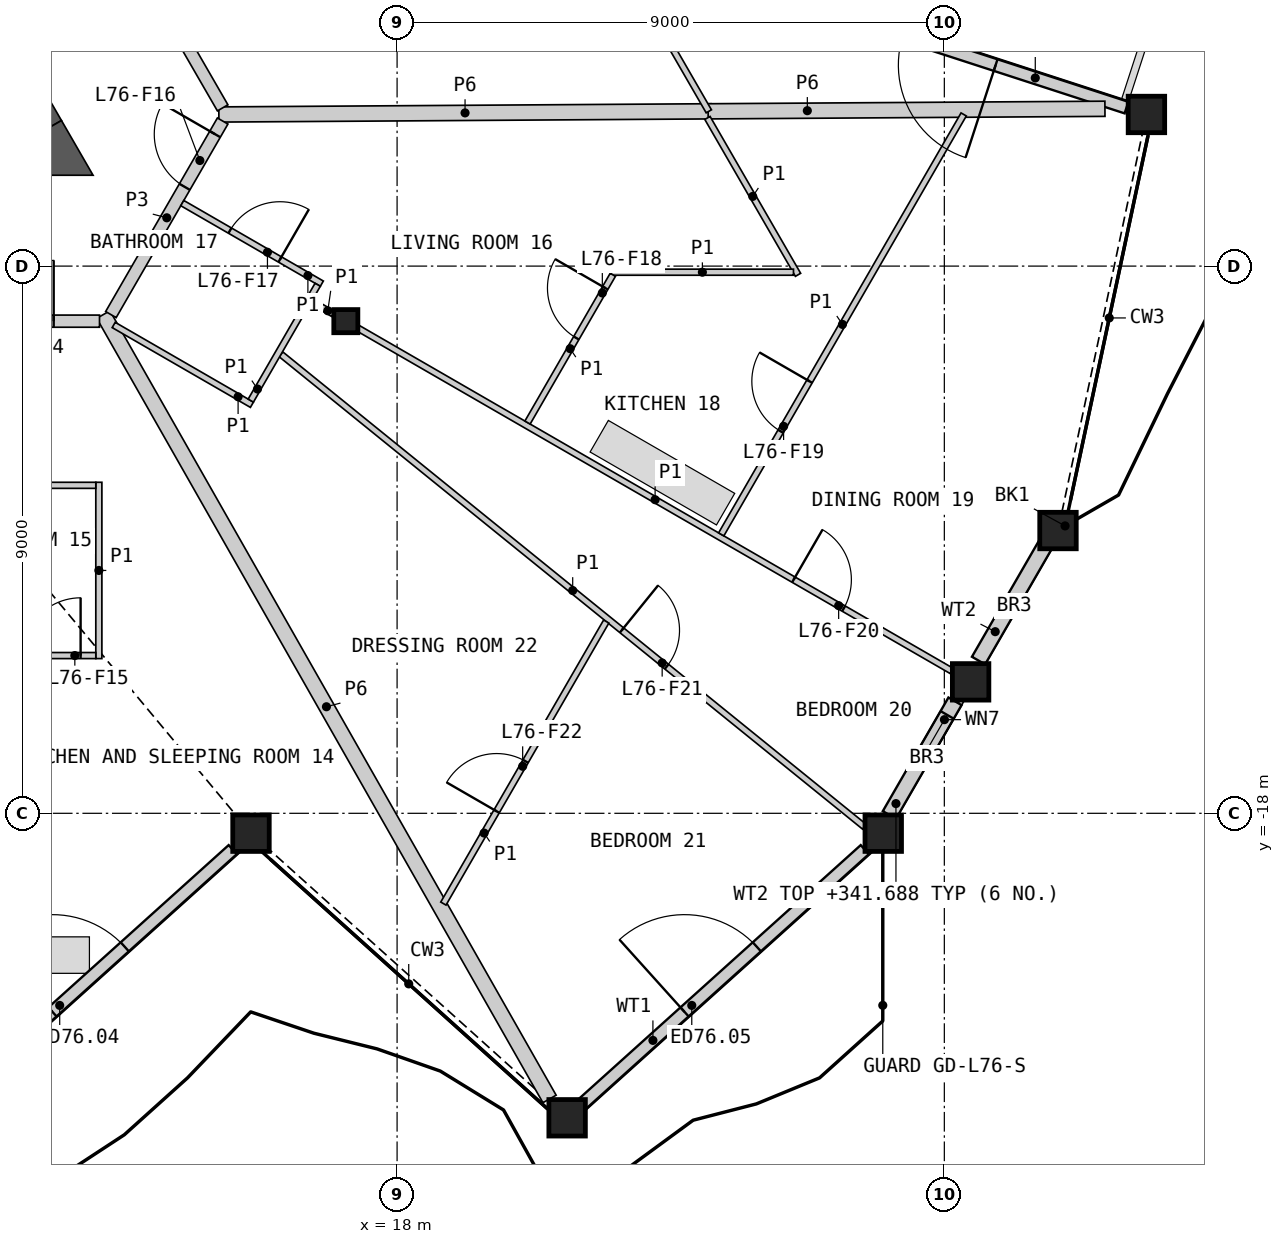
"""IFC4 building model, lengths in metres.
Left out: names, types, materials, properties, quantities, classifications, styles, units other than length and angle.
Written with IfcOpenShell. Run it as: python <this file> out.ifc"""

import sys

from ifc_helpers import new_model, si_unit, direction, frame, frame_2d, origin, origin_2d, place, context, subcontext, project, spatial, polyline, rectangle, hollow_rectangle, i_section, outline, extrude, element, fill, save


model = new_model("IFC4")
c1 = context("Model", 3, precision=1e-05, world=origin(), true_north=direction((0.0, 1.0)))
c2 = subcontext(c1, "Body", "Model", "MODEL_VIEW")
j1 = project(units=[si_unit("LENGTHUNIT", "METRE"), si_unit("PLANEANGLEUNIT", "RADIAN")], contexts=[c1])
p1 = place(None, origin())
s1 = spatial("IfcSite", under=j1, at=p1, CompositionType="ELEMENT")
p2 = place(p1, origin())
s2 = spatial("IfcBuilding", under=s1, at=p2, CompositionType="ELEMENT")
p3 = place(p2, frame((0.0, 0.0, 339.2)))
s3 = spatial("IfcBuildingStorey", under=s2, at=p3, CompositionType="ELEMENT", Elevation=339.2)
for number, where, z_axis, x_axis in (
    (1, (15.597, -18.327, 0.0), (0.0, 0.0, 1.0), (1.0, 0.0, 0.0)),
    (2, (20.796, -23.008, 0.0), (0.0, 0.0, 1.0), (1.0, 0.0, 0.0)),
    (3, (25.995, -18.327, 0.0), (0.0, 0.0, 1.0), (1.0, 0.0, 0.0)),
    (4, (27.432, -15.838, 0.0), (0.0, 0.0, 1.0), (1.0, 0.0, 0.0)),
    (5, (28.869, -13.349, 0.0), (0.0, 0.0, 1.0), (1.0, 0.0, 0.0)),
    (6, (30.324, -6.506, 0.0), (0.0, 0.0, 1.0), (1.0, 0.0, 0.0)),
):
    element("IfcColumn", number, at=place(p3, frame(where, z_axis=z_axis, x_axis=x_axis)), inside=s3, PredefinedType="COLUMN", context=c2, shape_type="SweptSolid", body=[
        extrude(hollow_rectangle(XDim=0.6, YDim=0.6, WallThickness=0.04, at=origin_2d()), origin(), (0.0, 0.0, 1.0), 3.4),
    ])
p4 = place(p3, frame((17.157, -9.906, 0.0), z_axis=(0.0, 0.0, 1.0), x_axis=(1.0, 0.0, 0.0)))
e7 = element("IfcColumn", 7, at=p4, inside=s3, PredefinedType="COLUMN", context=c2, shape_type="SweptSolid", body=[
    extrude(i_section(OverallWidth=0.396, OverallDepth=0.381, WebThickness=0.019, FlangeThickness=0.03, at=origin_2d()), origin(), (0.0, 0.0, 1.0), 3.4),
])
p5 = place(p3, frame((10.651, -22.781, 0.0), z_axis=(0.0, 0.0, 1.0), x_axis=(0.743154335217, 0.669120044572, 0.0)))
e8 = element("IfcWall", 8, at=p5, inside=s3, PredefinedType="SOLIDWALL", context=c2, shape_type="SweptSolid", body=[
    extrude(rectangle(XDim=6.252, YDim=0.2, at=frame_2d((3.126, 0.0))), origin(), (0.0, 0.0, 1.0), 2.488),
])
p6 = place(p5, frame((2.263, 0.0, 0.0)))
e9 = element("IfcOpeningElement", 9, at=p6, cuts=e8, PredefinedType="OPENING", context=c2, shape_type="SweptSolid", body=[
    extrude(rectangle(XDim=1.6, YDim=2.25, at=frame_2d((0.8, 1.125))), frame((0.0, 0.11, 0.0), z_axis=(0.0, -1.0, 0.0), x_axis=(1.0, 0.0, 0.0)), (0.0, 0.0, 1.0), 0.22),
])
p7 = place(p3, frame((21.046, -22.781, 0.0), z_axis=(0.0, 0.0, 1.0), x_axis=(0.743154335217, 0.669120044572, 0.0)))
e10 = element("IfcWall", 10, at=p7, inside=s3, PredefinedType="SOLIDWALL", context=c2, shape_type="SweptSolid", body=[
    extrude(rectangle(XDim=6.252, YDim=0.2, at=frame_2d((3.126, 0.0))), origin(), (0.0, 0.0, 1.0), 2.488),
])
p8 = place(p7, frame((2.263, 0.0, 0.0)))
e11 = element("IfcOpeningElement", 11, at=p8, cuts=e10, PredefinedType="OPENING", context=c2, shape_type="SweptSolid", body=[
    extrude(rectangle(XDim=1.6, YDim=2.25, at=frame_2d((0.8, 1.125))), frame((0.0, 0.11, 0.0), z_axis=(0.0, -1.0, 0.0), x_axis=(1.0, 0.0, 0.0)), (0.0, 0.0, 1.0), 0.22),
])
p9 = place(p3, frame((26.096, -18.027, 0.0), z_axis=(0.0, 0.0, 1.0), x_axis=(0.499983569942, 0.866034889475, 0.0)))
e12 = element("IfcWall", 12, at=p9, inside=s3, PredefinedType="SOLIDWALL", context=c2, shape_type="SweptSolid", body=[
    extrude(rectangle(XDim=2.158, YDim=0.25, at=frame_2d((1.079, 0.0))), origin(), (0.0, 0.0, 1.0), 2.488),
])
p10 = place(p9, frame((1.0, 0.0, 1.6)))
e13 = element("IfcOpeningElement", 13, at=p10, cuts=e12, PredefinedType="OPENING", context=c2, shape_type="SweptSolid", body=[
    extrude(rectangle(XDim=0.9, YDim=0.6, at=frame_2d((0.45, 0.3))), frame((0.0, 0.135, 0.0), z_axis=(0.0, -1.0, 0.0), x_axis=(1.0, 0.0, 0.0)), (0.0, 0.0, 1.0), 0.27),
])
p11 = place(p3, frame((27.562, -15.488, 0.0), z_axis=(0.0, 0.0, 1.0), x_axis=(0.500049712553, 0.865996700326, 0.0)))
e14 = element("IfcWall", 14, at=p11, inside=s3, PredefinedType="SOLIDWALL", context=c2, shape_type="SweptSolid", body=[
    extrude(rectangle(XDim=2.196, YDim=0.25, at=frame_2d((1.098, 0.0))), origin(), (0.0, 0.0, 1.0), 2.488),
])
p12 = place(p3, frame((29.996, -6.393, 0.0), z_axis=(0.0, 0.0, 1.0), x_axis=(-0.951051127664, 0.309033578383, 0.0)))
e15 = element("IfcWall", 15, at=p12, inside=s3, PredefinedType="SOLIDWALL", context=c2, shape_type="SweptSolid", body=[
    extrude(rectangle(XDim=6.31, YDim=0.2, at=frame_2d((3.155, 0.0))), origin(), (0.0, 0.0, 1.0), 2.488),
])
p13 = place(p12, frame((2.263, 0.0, 0.0)))
e16 = element("IfcOpeningElement", 16, at=p13, cuts=e15, PredefinedType="OPENING", context=c2, shape_type="SweptSolid", body=[
    extrude(rectangle(XDim=1.6, YDim=2.25, at=frame_2d((0.8, 1.125))), frame((0.0, 0.11, 0.0), z_axis=(0.0, -1.0, 0.0), x_axis=(1.0, 0.0, 0.0)), (0.0, 0.0, 1.0), 0.22),
])
p14 = place(p3, frame((12.221, -6.756, 0.0), z_axis=(0.0, 0.0, 1.0), x_axis=(-0.50000604952, 0.866021911064, 0.0)))
e17 = element("IfcWall", 17, at=p14, inside=s3, PredefinedType="SHEAR", context=c2, shape_type="SweptSolid", body=[
    extrude(rectangle(XDim=4.869, YDim=0.6, at=frame_2d((2.434, 0.0))), origin(), (0.0, 0.0, 1.0), 3.1),
])
p15 = place(p3, origin())
e18 = element("IfcWall", 18, at=p15, inside=s3, PredefinedType="SHEAR", context=c2, shape_type="SweptSolid", body=[
    extrude(outline(polyline([(11.961, -7.506), (11.961, -6.906), (12.48, -6.606), (13.0, -7.506), (11.961, -7.506)])), origin(), (0.0, 0.0, 1.0), 3.1),
])
p16 = place(p3, frame((13.169, -9.797, 0.0), z_axis=(0.0, 0.0, 1.0), x_axis=(0.494414335079, -0.869226360201, 0.0)))
e19 = element("IfcWall", 19, at=p16, inside=s3, PredefinedType="PARTITIONING", context=c2, shape_type="SweptSolid", body=[
    extrude(rectangle(XDim=14.842, YDim=0.25, at=frame_2d((7.421, 0.0))), origin(), (0.0, 0.0, 1.0), 2.33),
])
p17 = place(p3, frame((15.069, -6.506, 0.0), z_axis=(0.0, 0.0, 1.0), x_axis=(0.999979186485, 0.006451867641, 0.0)))
e20 = element("IfcWall", 20, at=p17, inside=s3, PredefinedType="PARTITIONING", context=c2, shape_type="SweptSolid", body=[
    extrude(rectangle(XDim=8.098, YDim=0.25, at=frame_2d((4.049, 0.0))), origin(), (0.0, 0.0, 1.0), 2.33),
])
p18 = place(p3, frame((23.115, -6.455, 0.0), z_axis=(0.0, 0.0, 1.0), x_axis=(0.999979299397, 0.006434343627, 0.0)))
e21 = element("IfcWall", 21, at=p18, inside=s3, PredefinedType="PARTITIONING", context=c2, shape_type="SweptSolid", body=[
    extrude(rectangle(XDim=6.526, YDim=0.25, at=frame_2d((3.263, 0.0))), origin(), (0.0, 0.0, 1.0), 2.33),
])
p19 = place(p3, frame((8.786, -9.906, 0.0), z_axis=(0.0, 0.0, 1.0), x_axis=(1.0, 0.0, 0.0)))
e22 = element("IfcWall", 22, at=p19, inside=s3, PredefinedType="PARTITIONING", context=c2, shape_type="SweptSolid", body=[
    extrude(rectangle(XDim=4.32, YDim=0.2, at=frame_2d((2.16, 0.0))), origin(), (0.0, 0.0, 1.0), 3.1),
])
p20 = place(p19, frame((2.566, 0.0, 0.0)))
e23 = element("IfcOpeningElement", 23, at=p20, cuts=e22, PredefinedType="OPENING", context=c2, shape_type="SweptSolid", body=[
    extrude(rectangle(XDim=1.0, YDim=2.1, at=frame_2d((0.5, 1.05))), frame((0.0, 0.11, 0.0), z_axis=(0.0, -1.0, 0.0), x_axis=(1.0, 0.0, 0.0)), (0.0, 0.0, 1.0), 0.22),
])
p21 = place(p3, frame((12.988, -2.684, 0.0), z_axis=(0.0, 0.0, 1.0), x_axis=(0.500003406062, -0.866023437285, 0.0)))
e24 = element("IfcWall", 24, at=p21, inside=s3, PredefinedType="PARTITIONING", context=c2, shape_type="SweptSolid", body=[
    extrude(rectangle(XDim=4.288, YDim=0.2, at=frame_2d((2.144, 0.0))), origin(), (0.0, 0.0, 1.0), 3.1),
])
p22 = place(p3, frame((13.293, -9.797, 0.0), z_axis=(0.0, 0.0, 1.0), x_axis=(0.499967746641, 0.866044024469, 0.0)))
e25 = element("IfcWall", 25, at=p22, inside=s3, PredefinedType="PARTITIONING", context=c2, shape_type="SweptSolid", body=[
    extrude(rectangle(XDim=3.676, YDim=0.2, at=frame_2d((1.838, 0.0))), origin(), (0.0, 0.0, 1.0), 3.1),
])
p23 = place(p22, frame((2.426, 0.0, 0.0)))
e26 = element("IfcOpeningElement", 26, at=p23, cuts=e25, PredefinedType="OPENING", context=c2, shape_type="SweptSolid", body=[
    extrude(rectangle(XDim=1.0, YDim=2.1, at=frame_2d((0.5, 1.05))), frame((0.0, 0.11, 0.0), z_axis=(0.0, -1.0, 0.0), x_axis=(1.0, 0.0, 0.0)), (0.0, 0.0, 1.0), 0.22),
])
p24 = place(p3, frame((16.091, -10.451, 0.0), z_axis=(0.0, 0.0, 1.0), x_axis=(0.77714308631, -0.629323941544, 0.0)))
e27 = element("IfcWall", 27, at=p24, inside=s3, PredefinedType="PARTITIONING", context=c2, shape_type="SweptSolid", body=[
    extrude(rectangle(XDim=12.346, YDim=0.1, at=frame_2d((6.173, 0.0))), origin(), (0.0, 0.0, 1.0), 2.33),
])
p25 = place(p24, frame((7.211, 0.0, 0.0)))
e28 = element("IfcOpeningElement", 28, at=p25, cuts=e27, PredefinedType="OPENING", context=c2, shape_type="SweptSolid", body=[
    extrude(rectangle(XDim=0.95, YDim=2.1, at=frame_2d((0.475, 1.05))), frame((0.0, 0.06, 0.0), z_axis=(0.0, -1.0, 0.0), x_axis=(1.0, 0.0, 0.0)), (0.0, 0.0, 1.0), 0.12),
])
p26 = place(p3, frame((17.365, -10.025, 0.0), z_axis=(0.0, 0.0, 1.0), x_axis=(0.866021046153, -0.500007547564, 0.0)))
e29 = element("IfcWall", 29, at=p26, inside=s3, PredefinedType="PARTITIONING", context=c2, shape_type="SweptSolid", body=[
    extrude(rectangle(XDim=11.267, YDim=0.1, at=frame_2d((5.634, 0.0))), origin(), (0.0, 0.0, 1.0), 2.33),
])
p27 = place(p26, frame((8.264, 0.0, 0.0)))
e30 = element("IfcOpeningElement", 30, at=p27, cuts=e29, PredefinedType="OPENING", context=c2, shape_type="SweptSolid", body=[
    extrude(rectangle(XDim=0.95, YDim=2.1, at=frame_2d((0.475, 1.05))), frame((0.0, 0.06, 0.0), z_axis=(0.0, -1.0, 0.0), x_axis=(1.0, 0.0, 0.0)), (0.0, 0.0, 1.0), 0.12),
])
p28 = place(p3, frame((23.331, -13.412, 0.0), z_axis=(0.0, 0.0, 1.0), x_axis=(0.499994510044, 0.866028573389, 0.0)))
e31 = element("IfcWall", 31, at=p28, inside=s3, PredefinedType="PARTITIONING", context=c2, shape_type="SweptSolid", body=[
    extrude(rectangle(XDim=7.975, YDim=0.1, at=frame_2d((3.988, 0.0))), origin(), (0.0, 0.0, 1.0), 2.33),
])
p29 = place(p28, frame((1.957, 0.0, 0.0)))
e32 = element("IfcOpeningElement", 32, at=p29, cuts=e31, PredefinedType="OPENING", context=c2, shape_type="SweptSolid", body=[
    extrude(rectangle(XDim=0.95, YDim=2.1, at=frame_2d((0.475, 1.05))), frame((0.0, 0.06, 0.0), z_axis=(0.0, -1.0, 0.0), x_axis=(1.0, 0.0, 0.0)), (0.0, 0.0, 1.0), 0.12),
])
p30 = place(p3, frame((19.773, -0.645, 0.0), z_axis=(0.0, 0.0, 1.0), x_axis=(0.499998644583, -0.866026186333, 0.0)))
e33 = element("IfcWall", 33, at=p30, inside=s3, PredefinedType="PARTITIONING", context=c2, shape_type="SweptSolid", body=[
    extrude(rectangle(XDim=6.708, YDim=0.1, at=frame_2d((3.354, 0.0))), origin(), (0.0, 0.0, 1.0), 2.33),
])
p31 = place(p30, frame((2.475, 0.0, 0.0)))
e34 = element("IfcOpeningElement", 34, at=p31, cuts=e33, PredefinedType="OPENING", context=c2, shape_type="SweptSolid", body=[
    extrude(rectangle(XDim=0.95, YDim=2.1, at=frame_2d((0.475, 1.05))), frame((0.0, 0.06, 0.0), z_axis=(0.0, -1.0, 0.0), x_axis=(1.0, 0.0, 0.0)), (0.0, 0.0, 1.0), 0.12),
])
p32 = place(p3, frame((18.761, -19.485, 0.0), z_axis=(0.0, 0.0, 1.0), x_axis=(0.500031527488, 0.866007200615, 0.0)))
e35 = element("IfcWall", 35, at=p32, inside=s3, PredefinedType="PARTITIONING", context=c2, shape_type="SweptSolid", body=[
    extrude(rectangle(XDim=5.356, YDim=0.1, at=frame_2d((2.678, 0.0))), origin(), (0.0, 0.0, 1.0), 2.33),
])
p33 = place(p32, frame((1.752, 0.0, 0.0)))
e36 = element("IfcOpeningElement", 36, at=p33, cuts=e35, PredefinedType="OPENING", context=c2, shape_type="SweptSolid", body=[
    extrude(rectangle(XDim=0.95, YDim=2.1, at=frame_2d((0.475, 1.05))), frame((0.0, 0.06, 0.0), z_axis=(0.0, -1.0, 0.0), x_axis=(1.0, 0.0, 0.0)), (0.0, 0.0, 1.0), 0.12),
])
p34 = place(p3, frame((23.104, -6.563, 0.0), z_axis=(0.0, 0.0, 1.0), x_axis=(0.499999078476, -0.866025935826, 0.0)))
e37 = element("IfcWall", 37, at=p34, inside=s3, PredefinedType="PARTITIONING", context=c2, shape_type="SweptSolid", body=[
    extrude(rectangle(XDim=2.979, YDim=0.1, at=frame_2d((1.49, 0.0))), origin(), (0.0, 0.0, 1.0), 2.33),
])
p35 = place(p3, frame((21.523, -9.1, 0.0), z_axis=(0.0, 0.0, 1.0), x_axis=(1.0, 0.0, 0.0)))
e38 = element("IfcWall", 38, at=p35, inside=s3, PredefinedType="PARTITIONING", context=c2, shape_type="SweptSolid", body=[
    extrude(rectangle(XDim=2.996, YDim=0.1, at=frame_2d((1.498, 0.0))), origin(), (0.0, 0.0, 1.0), 2.33),
])
p36 = place(p3, frame((20.145, -11.573, 0.0), z_axis=(0.0, 0.0, 1.0), x_axis=(0.49998612769, 0.866033412818, 0.0)))
e39 = element("IfcWall", 39, at=p36, inside=s3, PredefinedType="PARTITIONING", context=c2, shape_type="SweptSolid", body=[
    extrude(rectangle(XDim=2.805, YDim=0.1, at=frame_2d((1.403, 0.0))), origin(), (0.0, 0.0, 1.0), 2.33),
])
p37 = place(p36, frame((1.605, 0.0, 0.0)))
e40 = element("IfcOpeningElement", 40, at=p37, cuts=e39, PredefinedType="OPENING", context=c2, shape_type="SweptSolid", body=[
    extrude(rectangle(XDim=0.95, YDim=2.1, at=frame_2d((0.475, 1.05))), frame((0.0, 0.06, 0.0), z_axis=(0.0, -1.0, 0.0), x_axis=(1.0, 0.0, 0.0)), (0.0, 0.0, 1.0), 0.12),
])
p38 = place(p3, frame((13.095, -15.456, 0.0), z_axis=(0.0, 0.0, 1.0), x_axis=(0.0, 1.0, 0.0)))
e41 = element("IfcWall", 41, at=p38, inside=s3, PredefinedType="PARTITIONING", context=c2, shape_type="SweptSolid", body=[
    extrude(rectangle(XDim=2.9, YDim=0.1, at=frame_2d((1.45, 0.0))), origin(), (0.0, 0.0, 1.0), 2.33),
])
p39 = place(p3, frame((10.52, -12.606, 0.0), z_axis=(0.0, 0.0, 1.0), x_axis=(1.0, 0.0, 0.0)))
e42 = element("IfcWall", 42, at=p39, inside=s3, PredefinedType="PARTITIONING", context=c2, shape_type="SweptSolid", body=[
    extrude(rectangle(XDim=2.525, YDim=0.1, at=frame_2d((1.263, 0.0))), origin(), (0.0, 0.0, 1.0), 2.33),
])
p40 = place(p3, frame((10.52, -15.406, 0.0), z_axis=(0.0, 0.0, 1.0), x_axis=(1.0, 0.0, 0.0)))
e43 = element("IfcWall", 43, at=p40, inside=s3, PredefinedType="PARTITIONING", context=c2, shape_type="SweptSolid", body=[
    extrude(rectangle(XDim=2.525, YDim=0.1, at=frame_2d((1.263, 0.0))), origin(), (0.0, 0.0, 1.0), 2.33),
])
p41 = place(p40, frame((1.325, 0.0, 0.0)))
e44 = element("IfcOpeningElement", 44, at=p41, cuts=e43, PredefinedType="OPENING", context=c2, shape_type="SweptSolid", body=[
    extrude(rectangle(XDim=0.95, YDim=2.1, at=frame_2d((0.475, 1.05))), frame((0.0, 0.06, 0.0), z_axis=(0.0, -1.0, 0.0), x_axis=(1.0, 0.0, 0.0)), (0.0, 0.0, 1.0), 0.12),
])
p42 = place(p3, frame((14.468, -7.964, 0.0), z_axis=(0.0, 0.0, 1.0), x_axis=(0.865989200783, -0.500062700197, 0.0)))
e45 = element("IfcWall", 45, at=p42, inside=s3, PredefinedType="PARTITIONING", context=c2, shape_type="SweptSolid", body=[
    extrude(rectangle(XDim=2.65, YDim=0.1, at=frame_2d((1.325, 0.0))), origin(), (0.0, 0.0, 1.0), 2.33),
])
p43 = place(p42, frame((0.905, 0.0, 0.0)))
e46 = element("IfcOpeningElement", 46, at=p43, cuts=e45, PredefinedType="OPENING", context=c2, shape_type="SweptSolid", body=[
    extrude(rectangle(XDim=0.95, YDim=2.1, at=frame_2d((0.475, 1.05))), frame((0.0, 0.06, 0.0), z_axis=(0.0, -1.0, 0.0), x_axis=(1.0, 0.0, 0.0)), (0.0, 0.0, 1.0), 0.12),
])
p44 = place(p3, frame((13.339, -9.968, 0.0), z_axis=(0.0, 0.0, 1.0), x_axis=(0.866036909293, -0.499980071345, 0.0)))
e47 = element("IfcWall", 47, at=p44, inside=s3, PredefinedType="PARTITIONING", context=c2, shape_type="SweptSolid", body=[
    extrude(rectangle(XDim=2.625, YDim=0.1, at=frame_2d((1.312, 0.0))), origin(), (0.0, 0.0, 1.0), 2.33),
])
p45 = place(p3, frame((15.594, -11.212, 0.0), z_axis=(0.0, 0.0, 1.0), x_axis=(0.499898558967, 0.866083962871, 0.0)))
e48 = element("IfcWall", 48, at=p45, inside=s3, PredefinedType="PARTITIONING", context=c2, shape_type="SweptSolid", body=[
    extrude(rectangle(XDim=2.2, YDim=0.1, at=frame_2d((1.1, 0.0))), origin(), (0.0, 0.0, 1.0), 2.33),
])
p46 = place(p3, frame((16.594, -9.581, 0.0), z_axis=(0.0, 0.0, 1.0), x_axis=(0.866036909293, -0.499980071345, 0.0)))
e49 = element("IfcWall", 49, at=p46, inside=s3, PredefinedType="PARTITIONING", context=c2, shape_type="SweptSolid", body=[
    extrude(rectangle(XDim=0.41, YDim=0.1, at=frame_2d((0.205, 0.0))), origin(), (0.0, 0.0, 1.0), 2.33),
])
p47 = place(p6, origin())
e50 = element("IfcDoor", 50, at=p47, inside=s3, OperationType="DOUBLE_DOOR_SINGLE_SWING", PredefinedType="DOOR", context=c2, shape_type="SweptSolid", body=[
    extrude(rectangle(XDim=1.6, YDim=2.25, at=frame_2d((0.8, 1.125))), frame((0.0, 0.025, 0.0), z_axis=(0.0, -1.0, 0.0), x_axis=(1.0, 0.0, 0.0)), (0.0, 0.0, 1.0), 0.05),
])
fill(e9, e50)
p48 = place(p8, origin())
e51 = element("IfcDoor", 51, at=p48, inside=s3, OperationType="DOUBLE_DOOR_SINGLE_SWING", PredefinedType="DOOR", context=c2, shape_type="SweptSolid", body=[
    extrude(rectangle(XDim=1.6, YDim=2.25, at=frame_2d((0.8, 1.125))), frame((0.0, 0.025, 0.0), z_axis=(0.0, -1.0, 0.0), x_axis=(1.0, 0.0, 0.0)), (0.0, 0.0, 1.0), 0.05),
])
fill(e11, e51)
p49 = place(p10, origin())
e52 = element("IfcWindow", 52, at=p49, inside=s3, PartitioningType="SINGLE_PANEL", PredefinedType="WINDOW", context=c2, shape_type="SweptSolid", body=[
    extrude(rectangle(XDim=0.9, YDim=0.6, at=frame_2d((0.45, 0.3))), frame((0.0, 0.03, 0.0), z_axis=(0.0, -1.0, 0.0), x_axis=(1.0, 0.0, 0.0)), (0.0, 0.0, 1.0), 0.06),
])
fill(e13, e52)
p50 = place(p13, origin())
e53 = element("IfcDoor", 53, at=p50, inside=s3, OperationType="DOUBLE_DOOR_SINGLE_SWING", PredefinedType="DOOR", context=c2, shape_type="SweptSolid", body=[
    extrude(rectangle(XDim=1.6, YDim=2.25, at=frame_2d((0.8, 1.125))), frame((0.0, 0.025, 0.0), z_axis=(0.0, -1.0, 0.0), x_axis=(1.0, 0.0, 0.0)), (0.0, 0.0, 1.0), 0.05),
])
fill(e16, e53)
p51 = place(p20, origin())
e54 = element("IfcDoor", 54, at=p51, inside=s3, OperationType="SINGLE_SWING_RIGHT", PredefinedType="DOOR", context=c2, shape_type="SweptSolid", body=[
    extrude(rectangle(XDim=1.0, YDim=2.1, at=frame_2d((0.5, 1.05))), frame((0.0, 0.025, 0.0), z_axis=(0.0, -1.0, 0.0), x_axis=(1.0, 0.0, 0.0)), (0.0, 0.0, 1.0), 0.05),
])
fill(e23, e54)
p52 = place(p41, origin())
e55 = element("IfcDoor", 55, at=p52, inside=s3, OperationType="SINGLE_SWING_RIGHT", PredefinedType="DOOR", context=c2, shape_type="SweptSolid", body=[
    extrude(rectangle(XDim=0.95, YDim=2.1, at=frame_2d((0.475, 1.05))), frame((0.0, 0.025, 0.0), z_axis=(0.0, -1.0, 0.0), x_axis=(1.0, 0.0, 0.0)), (0.0, 0.0, 1.0), 0.05),
])
fill(e44, e55)
p53 = place(p23, origin())
e56 = element("IfcDoor", 56, at=p53, inside=s3, OperationType="SINGLE_SWING_RIGHT", PredefinedType="DOOR", context=c2, shape_type="SweptSolid", body=[
    extrude(rectangle(XDim=1.0, YDim=2.1, at=frame_2d((0.5, 1.05))), frame((0.0, 0.025, 0.0), z_axis=(0.0, -1.0, 0.0), x_axis=(1.0, 0.0, 0.0)), (0.0, 0.0, 1.0), 0.05),
])
fill(e26, e56)
p54 = place(p43, origin())
e57 = element("IfcDoor", 57, at=p54, inside=s3, OperationType="SINGLE_SWING_RIGHT", PredefinedType="DOOR", context=c2, shape_type="SweptSolid", body=[
    extrude(rectangle(XDim=0.95, YDim=2.1, at=frame_2d((0.475, 1.05))), frame((0.0, 0.025, 0.0), z_axis=(0.0, -1.0, 0.0), x_axis=(1.0, 0.0, 0.0)), (0.0, 0.0, 1.0), 0.05),
])
fill(e46, e57)
p55 = place(p37, origin())
e58 = element("IfcDoor", 58, at=p55, inside=s3, OperationType="SINGLE_SWING_RIGHT", PredefinedType="DOOR", context=c2, shape_type="SweptSolid", body=[
    extrude(rectangle(XDim=0.95, YDim=2.1, at=frame_2d((0.475, 1.05))), frame((0.0, 0.025, 0.0), z_axis=(0.0, -1.0, 0.0), x_axis=(1.0, 0.0, 0.0)), (0.0, 0.0, 1.0), 0.05),
])
fill(e40, e58)
p56 = place(p29, origin())
e59 = element("IfcDoor", 59, at=p56, inside=s3, OperationType="SINGLE_SWING_RIGHT", PredefinedType="DOOR", context=c2, shape_type="SweptSolid", body=[
    extrude(rectangle(XDim=0.95, YDim=2.1, at=frame_2d((0.475, 1.05))), frame((0.0, 0.025, 0.0), z_axis=(0.0, -1.0, 0.0), x_axis=(1.0, 0.0, 0.0)), (0.0, 0.0, 1.0), 0.05),
])
fill(e32, e59)
p57 = place(p27, origin())
e60 = element("IfcDoor", 60, at=p57, inside=s3, OperationType="SINGLE_SWING_LEFT", PredefinedType="DOOR", context=c2, shape_type="SweptSolid", body=[
    extrude(rectangle(XDim=0.95, YDim=2.1, at=frame_2d((0.475, 1.05))), frame((0.0, 0.025, 0.0), z_axis=(0.0, -1.0, 0.0), x_axis=(1.0, 0.0, 0.0)), (0.0, 0.0, 1.0), 0.05),
])
fill(e30, e60)
p58 = place(p25, origin())
e61 = element("IfcDoor", 61, at=p58, inside=s3, OperationType="SINGLE_SWING_LEFT", PredefinedType="DOOR", context=c2, shape_type="SweptSolid", body=[
    extrude(rectangle(XDim=0.95, YDim=2.1, at=frame_2d((0.475, 1.05))), frame((0.0, 0.025, 0.0), z_axis=(0.0, -1.0, 0.0), x_axis=(1.0, 0.0, 0.0)), (0.0, 0.0, 1.0), 0.05),
])
fill(e28, e61)
p59 = place(p33, origin())
e62 = element("IfcDoor", 62, at=p59, inside=s3, OperationType="SINGLE_SWING_LEFT", PredefinedType="DOOR", context=c2, shape_type="SweptSolid", body=[
    extrude(rectangle(XDim=0.95, YDim=2.1, at=frame_2d((0.475, 1.05))), frame((0.0, 0.025, 0.0), z_axis=(0.0, -1.0, 0.0), x_axis=(1.0, 0.0, 0.0)), (0.0, 0.0, 1.0), 0.05),
])
fill(e36, e62)
save(model, sys.argv[1])
